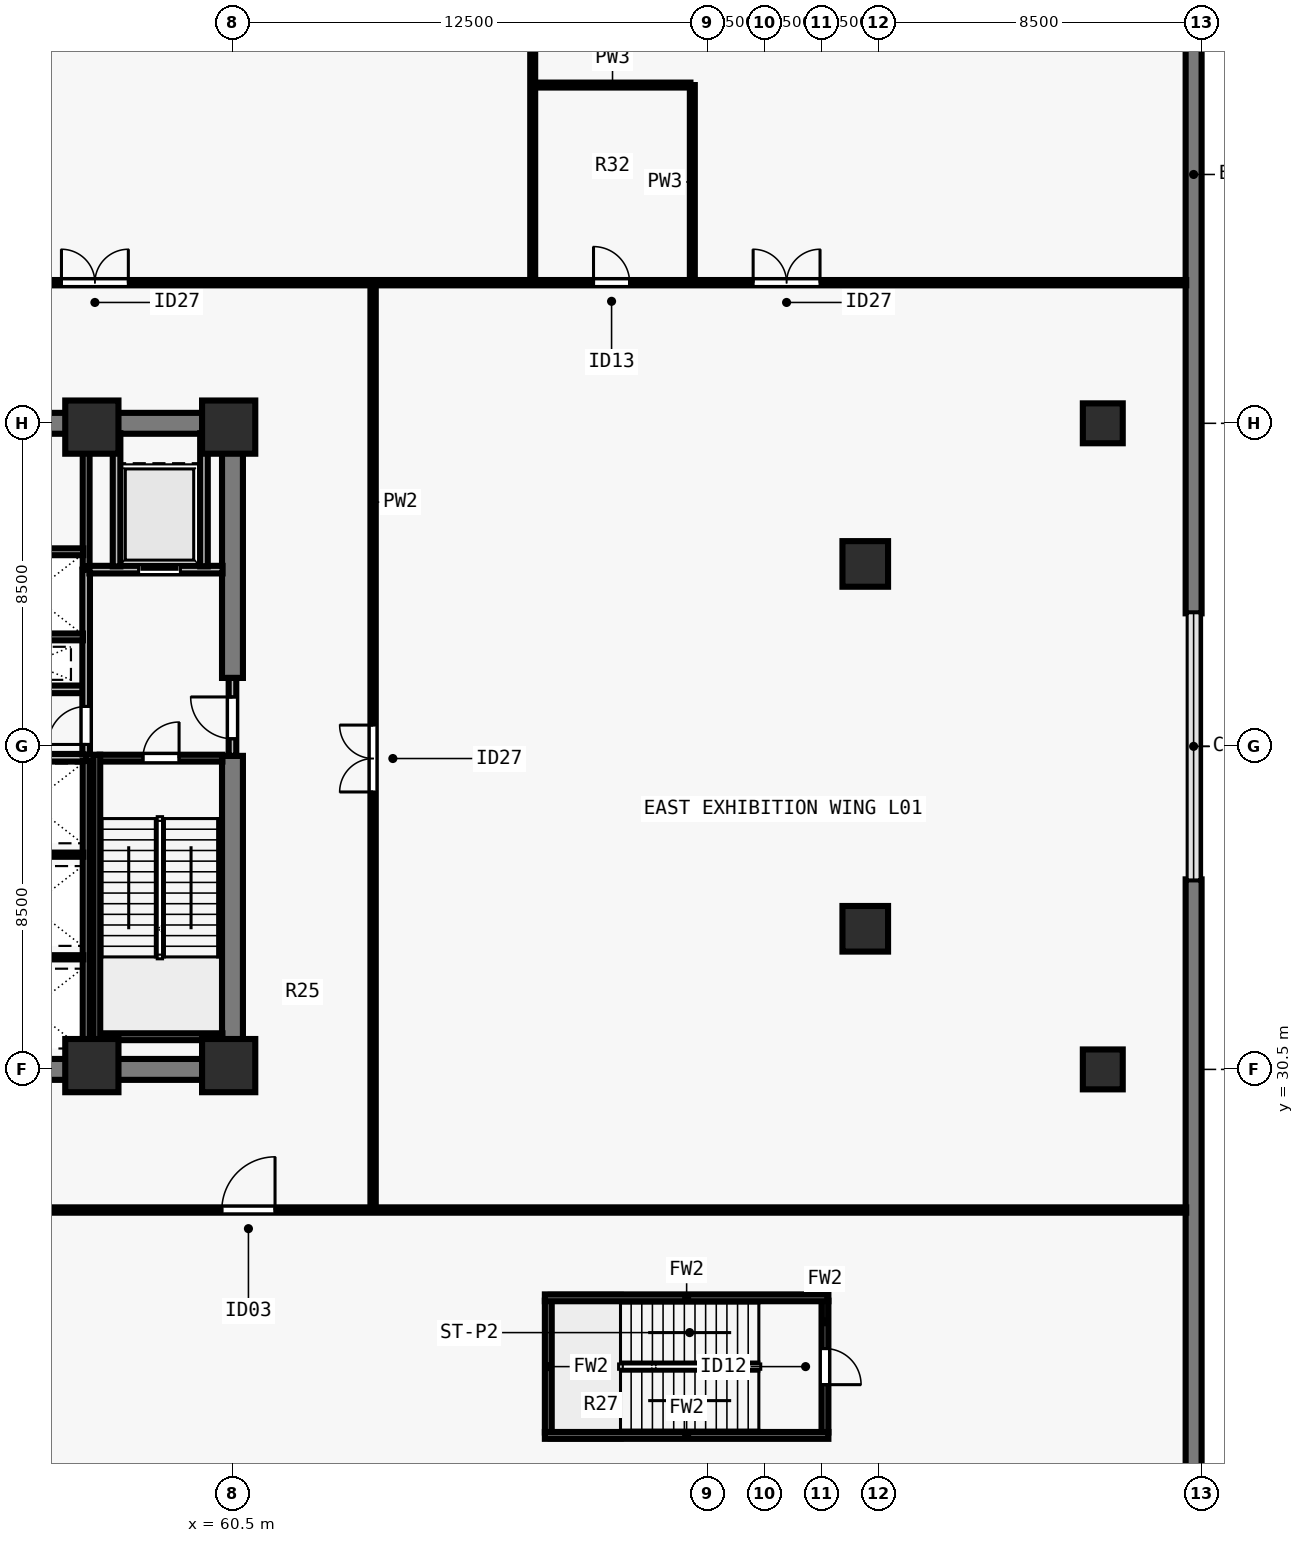
"""IFC4 building model, lengths in metres.
Left out: names, types, materials, properties, quantities, classifications, styles, units other than length and angle.
Written with IfcOpenShell. Run it as: python <this file> out.ifc"""

import sys

from ifc_helpers import new_model, si_unit, direction, frame, frame_2d, origin, origin_2d, place, context, subcontext, project, spatial, rectangle, extrude, element, fill, save


model = new_model("IFC4")
c1 = context("Model", 3, precision=1e-05, world=origin(), true_north=direction((0.0, 1.0)))
c2 = subcontext(c1, "Body", "Model", "MODEL_VIEW")
j1 = project(units=[si_unit("LENGTHUNIT", "METRE"), si_unit("PLANEANGLEUNIT", "RADIAN")], contexts=[c1])
p1 = place(None, origin())
s1 = spatial("IfcSite", under=j1, at=p1, CompositionType="ELEMENT")
p2 = place(p1, origin())
s2 = spatial("IfcBuilding", under=s1, at=p2, CompositionType="ELEMENT")
p3 = place(p2, frame((0.0, 0.0, 5.0)))
s3 = spatial("IfcBuildingStorey", under=s2, at=p3, CompositionType="ELEMENT", Elevation=5.0)
for number, where, z_axis, x_axis in (
    (1, (56.8, 30.6, 0.0), (0.0, 0.0, 1.0), (1.0, 0.0, 0.0)),
    (2, (60.4, 30.6, 0.0), (0.0, 0.0, 1.0), (1.0, 0.0, 0.0)),
    (3, (56.8, 47.4, 0.0), (0.0, 0.0, 1.0), (1.0, 0.0, 0.0)),
    (4, (60.4, 47.4, 0.0), (0.0, 0.0, 1.0), (1.0, 0.0, 0.0)),
):
    element("IfcColumn", number, at=place(p3, frame(where, z_axis=z_axis, x_axis=x_axis)), inside=s3, PredefinedType="COLUMN", context=c2, shape_type="SweptSolid", body=[
        extrude(rectangle(XDim=1.4, YDim=1.4, at=origin_2d()), origin(), (0.0, 0.0, 1.0), 5.0),
    ])
for number, where, z_axis, x_axis in (
    (5, (77.15, 34.2, 0.0), (0.0, 0.0, 1.0), (1.0, 0.0, 0.0)),
    (6, (77.15, 43.8, 0.0), (0.0, 0.0, 1.0), (1.0, 0.0, 0.0)),
):
    element("IfcColumn", number, at=place(p3, frame(where, z_axis=z_axis, x_axis=x_axis)), inside=s3, PredefinedType="COLUMN", context=c2, shape_type="SweptSolid", body=[
        extrude(rectangle(XDim=1.2, YDim=1.2, at=origin_2d()), origin(), (0.0, 0.0, 1.0), 5.0),
    ])
for number, where, z_axis, x_axis in (
    (7, (83.4, 30.5, 0.0), (0.0, 0.0, 1.0), (1.0, 0.0, 0.0)),
    (8, (83.4, 47.5, 0.0), (0.0, 0.0, 1.0), (1.0, 0.0, 0.0)),
):
    element("IfcColumn", number, at=place(p3, frame(where, z_axis=z_axis, x_axis=x_axis)), inside=s3, PredefinedType="COLUMN", context=c2, shape_type="SweptSolid", body=[
        extrude(rectangle(XDim=1.05, YDim=1.05, at=origin_2d()), origin(), (0.0, 0.0, 1.0), 5.0),
    ])
for number, where, z_axis, x_axis in (
    (9, (85.79, 65.595, 0.0), (0.0, 0.0, 1.0), (0.0, -1.0, 0.0)),
    (10, (85.79, 35.5, 0.0), (0.0, 0.0, 1.0), (0.0, -1.0, 0.0)),
):
    element("IfcWall", number, at=place(p3, frame(where, z_axis=z_axis, x_axis=x_axis)), inside=s3, PredefinedType="SOLIDWALL", context=c2, shape_type="SweptSolid", body=[
        extrude(rectangle(XDim=23.095, YDim=0.42, at=frame_2d((11.547, 0.0))), origin(), (0.0, 0.0, 1.0), 4.72),
    ])
for number, where, z_axis, x_axis in (
    (11, (43.225, 30.5, 0.0), (0.0, 0.0, 1.0), (1.0, 0.0, 0.0)),
    (12, (43.225, 47.5, 0.0), (0.0, 0.0, 1.0), (1.0, 0.0, 0.0)),
):
    element("IfcWall", number, at=place(p3, frame(where, z_axis=z_axis, x_axis=x_axis)), inside=s3, PredefinedType="SHEAR", context=c2, shape_type="SweptSolid", body=[
        extrude(rectangle(XDim=17.55, YDim=0.55, at=frame_2d((8.775, 0.0))), origin(), (0.0, 0.0, 1.0), 4.72),
    ])
p4 = place(p3, frame((60.5, 30.765, 0.0), z_axis=(0.0, 0.0, 1.0), x_axis=(0.0, 1.0, 0.0)))
e13 = element("IfcWall", 13, at=p4, inside=s3, PredefinedType="SHEAR", context=c2, shape_type="SweptSolid", body=[
    extrude(rectangle(XDim=7.985, YDim=0.55, at=frame_2d((3.993, 0.0))), origin(), (0.0, 0.0, 1.0), 4.72),
])
p5 = place(p3, frame((60.5, 40.8, 0.0), z_axis=(0.0, 0.0, 1.0), x_axis=(0.0, 1.0, 0.0)))
e14 = element("IfcWall", 14, at=p5, inside=s3, PredefinedType="SHEAR", context=c2, shape_type="SweptSolid", body=[
    extrude(rectangle(XDim=6.435, YDim=0.55, at=frame_2d((3.218, 0.0))), origin(), (0.0, 0.0, 1.0), 4.72),
])
for number, where, z_axis, x_axis in (
    (15, (53.7, 38.7, 0.0), (0.0, 0.0, 1.0), (1.0, 0.0, 0.0)),
    (16, (53.7, 40.5, 0.0), (0.0, 0.0, 1.0), (1.0, 0.0, 0.0)),
):
    element("IfcWall", number, at=place(p3, frame(where, z_axis=z_axis, x_axis=x_axis)), inside=s3, PredefinedType="SOLIDWALL", context=c2, shape_type="SweptSolid", body=[
        extrude(rectangle(XDim=2.95, YDim=0.2, at=frame_2d((1.475, 0.0))), origin(), (0.0, 0.0, 1.0), 4.72),
    ])
p6 = place(p3, frame((60.5, 38.75, 0.0), z_axis=(0.0, 0.0, 1.0), x_axis=(0.0, 1.0, 0.0)))
e17 = element("IfcWall", 17, at=p6, inside=s3, PredefinedType="SOLIDWALL", context=c2, shape_type="SweptSolid", body=[
    extrude(rectangle(XDim=2.05, YDim=0.2, at=frame_2d((1.025, 0.0))), origin(), (0.0, 0.0, 1.0), 4.72),
])
p7 = place(p6, frame((0.45, 0.0, 0.0)))
e18 = element("IfcOpeningElement", 18, at=p7, cuts=e17, PredefinedType="OPENING", context=c2, shape_type="SweptSolid", body=[
    extrude(rectangle(XDim=1.1, YDim=2.15, at=frame_2d((0.55, 1.075))), frame((0.0, 0.11, 0.0), z_axis=(0.0, -1.0, 0.0), x_axis=(1.0, 0.0, 0.0)), (0.0, 0.0, 1.0), 0.22),
])
p8 = place(p3, frame((56.65, 38.785, 0.0), z_axis=(0.0, 0.0, 1.0), x_axis=(0.0, 1.0, 0.0)))
e19 = element("IfcWall", 19, at=p8, inside=s3, PredefinedType="SOLIDWALL", context=c2, shape_type="SweptSolid", body=[
    extrude(rectangle(XDim=4.865, YDim=0.2, at=frame_2d((2.433, 0.0))), origin(), (0.0, 0.0, 1.0), 4.72),
])
p9 = place(p8, frame((0.265, 0.0, 0.0)))
e20 = element("IfcOpeningElement", 20, at=p9, cuts=e19, PredefinedType="OPENING", context=c2, shape_type="SweptSolid", body=[
    extrude(rectangle(XDim=1.0, YDim=2.15, at=frame_2d((0.5, 1.075))), frame((0.0, 0.11, 0.0), z_axis=(0.0, -1.0, 0.0), x_axis=(1.0, 0.0, 0.0)), (0.0, 0.0, 1.0), 0.22),
])
p10 = place(p3, frame((56.735, 43.65, 0.0), z_axis=(0.0, 0.0, 1.0), x_axis=(1.0, 0.0, 0.0)))
e21 = element("IfcWall", 21, at=p10, inside=s3, PredefinedType="SOLIDWALL", context=c2, shape_type="SweptSolid", body=[
    extrude(rectangle(XDim=3.505, YDim=0.2, at=frame_2d((1.752, 0.0))), origin(), (0.0, 0.0, 1.0), 4.72),
])
p11 = place(p10, frame((1.295, 0.0, 0.0)))
e22 = element("IfcOpeningElement", 22, at=p11, cuts=e21, PredefinedType="OPENING", context=c2, shape_type="SweptSolid", body=[
    extrude(rectangle(XDim=1.1, YDim=2.2, at=frame_2d((0.55, 1.1))), frame((0.0, 0.11, 0.0), z_axis=(0.0, -1.0, 0.0), x_axis=(1.0, 0.0, 0.0)), (0.0, 0.0, 1.0), 0.22),
])
for number, where, z_axis, x_axis in (
    (23, (57.45, 43.735, 0.0), (0.0, 0.0, 1.0), (0.0, 1.0, 0.0)),
    (24, (59.75, 43.735, 0.0), (0.0, 0.0, 1.0), (0.0, 1.0, 0.0)),
):
    element("IfcWall", number, at=place(p3, frame(where, z_axis=z_axis, x_axis=x_axis)), inside=s3, PredefinedType="SOLIDWALL", context=c2, shape_type="SweptSolid", body=[
        extrude(rectangle(XDim=3.505, YDim=0.2, at=frame_2d((1.752, 0.0))), origin(), (0.0, 0.0, 1.0), 4.72),
    ])
p12 = place(p3, frame((56.65, 30.76, 0.0), z_axis=(0.0, 0.0, 1.0), x_axis=(0.0, 1.0, 0.0)))
e25 = element("IfcWall", 25, at=p12, inside=s3, PredefinedType="SOLIDWALL", context=c2, shape_type="SweptSolid", body=[
    extrude(rectangle(XDim=7.855, YDim=0.18, at=frame_2d((3.927, 0.0))), origin(), (0.0, 0.0, 1.0), 4.72),
])
for number, where, z_axis, x_axis in (
    (26, (53.785, 33.45, 0.0), (0.0, 0.0, 1.0), (1.0, 0.0, 0.0)),
    (27, (53.785, 36.15, 0.0), (0.0, 0.0, 1.0), (1.0, 0.0, 0.0)),
):
    element("IfcWall", number, at=place(p3, frame(where, z_axis=z_axis, x_axis=x_axis)), inside=s3, PredefinedType="PARTITIONING", context=c2, shape_type="SweptSolid", body=[
        extrude(rectangle(XDim=2.79, YDim=0.11, at=frame_2d((1.395, 0.0))), origin(), (0.0, 0.0, 1.0), 4.72),
    ])
p13 = place(p3, frame((56.65, 43.735, 0.0), z_axis=(0.0, 0.0, 1.0), x_axis=(0.0, 1.0, 0.0)))
e28 = element("IfcWall", 28, at=p13, inside=s3, PredefinedType="SOLIDWALL", context=c2, shape_type="SweptSolid", body=[
    extrude(rectangle(XDim=3.505, YDim=0.18, at=frame_2d((1.752, 0.0))), origin(), (0.0, 0.0, 1.0), 4.72),
])
p14 = place(p3, frame((53.785, 41.88, 0.0), z_axis=(0.0, 0.0, 1.0), x_axis=(1.0, 0.0, 0.0)))
e29 = element("IfcWall", 29, at=p14, inside=s3, PredefinedType="SOLIDWALL", context=c2, shape_type="SweptSolid", body=[
    extrude(rectangle(XDim=2.78, YDim=0.18, at=frame_2d((1.39, 0.0))), origin(), (0.0, 0.0, 1.0), 4.72),
])
p15 = place(p3, frame((53.785, 44.12, 0.0), z_axis=(0.0, 0.0, 1.0), x_axis=(1.0, 0.0, 0.0)))
e30 = element("IfcWall", 30, at=p15, inside=s3, PredefinedType="SOLIDWALL", context=c2, shape_type="SweptSolid", body=[
    extrude(rectangle(XDim=2.79, YDim=0.18, at=frame_2d((1.395, 0.0))), origin(), (0.0, 0.0, 1.0), 4.72),
])
p16 = place(p3, frame((18.405, 26.8, 0.0), z_axis=(0.0, 0.0, 1.0), x_axis=(1.0, 0.0, 0.0)))
e31 = element("IfcWall", 31, at=p16, inside=s3, PredefinedType="PARTITIONING", context=c2, shape_type="SweptSolid", body=[
    extrude(rectangle(XDim=67.19, YDim=0.14, at=frame_2d((33.595, 0.0))), origin(), (0.0, 0.0, 1.0), 4.238),
])
p17 = place(p16, frame((13.815, 0.0, 0.0)))
e32 = element("IfcOpeningElement", 32, at=p17, cuts=e31, PredefinedType="OPENING", context=c2, shape_type="SweptSolid", body=[
    extrude(rectangle(XDim=1.4, YDim=2.2, at=frame_2d((0.7, 1.1))), frame((0.0, 0.08, 0.0), z_axis=(0.0, -1.0, 0.0), x_axis=(1.0, 0.0, 0.0)), (0.0, 0.0, 1.0), 0.16),
])
p18 = place(p16, frame((41.815, 0.0, 0.0)))
e33 = element("IfcOpeningElement", 33, at=p18, cuts=e31, PredefinedType="OPENING", context=c2, shape_type="SweptSolid", body=[
    extrude(rectangle(XDim=1.4, YDim=2.2, at=frame_2d((0.7, 1.1))), frame((0.0, 0.08, 0.0), z_axis=(0.0, -1.0, 0.0), x_axis=(1.0, 0.0, 0.0)), (0.0, 0.0, 1.0), 0.16),
])
p19 = place(p3, frame((18.405, 51.2, 0.0), z_axis=(0.0, 0.0, 1.0), x_axis=(1.0, 0.0, 0.0)))
e34 = element("IfcWall", 34, at=p19, inside=s3, PredefinedType="PARTITIONING", context=c2, shape_type="SweptSolid", body=[
    extrude(rectangle(XDim=67.19, YDim=0.14, at=frame_2d((33.595, 0.0))), origin(), (0.0, 0.0, 1.0), 4.238),
])
p20 = place(p19, frame((24.795, 0.0, 0.0)))
e35 = element("IfcOpeningElement", 35, at=p20, cuts=e34, PredefinedType="OPENING", context=c2, shape_type="SweptSolid", body=[
    extrude(rectangle(XDim=1.76, YDim=2.2, at=frame_2d((0.88, 1.1))), frame((0.0, 0.08, 0.0), z_axis=(0.0, -1.0, 0.0), x_axis=(1.0, 0.0, 0.0)), (0.0, 0.0, 1.0), 0.16),
])
p21 = place(p19, frame((37.595, 0.0, 0.0)))
e36 = element("IfcOpeningElement", 36, at=p21, cuts=e34, PredefinedType="OPENING", context=c2, shape_type="SweptSolid", body=[
    extrude(rectangle(XDim=1.76, YDim=2.2, at=frame_2d((0.88, 1.1))), frame((0.0, 0.08, 0.0), z_axis=(0.0, -1.0, 0.0), x_axis=(1.0, 0.0, 0.0)), (0.0, 0.0, 1.0), 0.16),
])
p22 = place(p19, frame((51.595, 0.0, 0.0)))
e37 = element("IfcOpeningElement", 37, at=p22, cuts=e34, PredefinedType="OPENING", context=c2, shape_type="SweptSolid", body=[
    extrude(rectangle(XDim=0.95, YDim=2.1, at=frame_2d((0.475, 1.05))), frame((0.0, 0.08, 0.0), z_axis=(0.0, -1.0, 0.0), x_axis=(1.0, 0.0, 0.0)), (0.0, 0.0, 1.0), 0.16),
])
p23 = place(p19, frame((55.795, 0.0, 0.0)))
e38 = element("IfcOpeningElement", 38, at=p23, cuts=e34, PredefinedType="OPENING", context=c2, shape_type="SweptSolid", body=[
    extrude(rectangle(XDim=1.76, YDim=2.2, at=frame_2d((0.88, 1.1))), frame((0.0, 0.08, 0.0), z_axis=(0.0, -1.0, 0.0), x_axis=(1.0, 0.0, 0.0)), (0.0, 0.0, 1.0), 0.16),
])
p24 = place(p3, frame((64.2, 26.855, 0.0), z_axis=(0.0, 0.0, 1.0), x_axis=(0.0, 1.0, 0.0)))
e39 = element("IfcWall", 39, at=p24, inside=s3, PredefinedType="PARTITIONING", context=c2, shape_type="SweptSolid", body=[
    extrude(rectangle(XDim=24.29, YDim=0.14, at=frame_2d((12.145, 0.0))), origin(), (0.0, 0.0, 1.0), 4.72),
])
p25 = place(p24, frame((10.945, 0.0, 0.0)))
e40 = element("IfcOpeningElement", 40, at=p25, cuts=e39, PredefinedType="OPENING", context=c2, shape_type="SweptSolid", body=[
    extrude(rectangle(XDim=1.76, YDim=2.2, at=frame_2d((0.88, 1.1))), frame((0.0, 0.08, 0.0), z_axis=(0.0, -1.0, 0.0), x_axis=(1.0, 0.0, 0.0)), (0.0, 0.0, 1.0), 0.16),
])
p26 = place(p3, frame((68.4, 51.3, 0.0), z_axis=(0.0, 0.0, 1.0), x_axis=(0.0, 1.0, 0.0)))
e41 = element("IfcWall", 41, at=p26, inside=s3, PredefinedType="PLUMBINGWALL", context=c2, shape_type="SweptSolid", body=[
    extrude(rectangle(XDim=14.295, YDim=0.13, at=frame_2d((7.147, 0.0))), origin(), (0.0, 0.0, 1.0), 3.771),
])
p27 = place(p3, frame((72.6, 51.3, 0.0), z_axis=(0.0, 0.0, 1.0), x_axis=(0.0, 1.0, 0.0)))
e42 = element("IfcWall", 42, at=p27, inside=s3, PredefinedType="PLUMBINGWALL", context=c2, shape_type="SweptSolid", body=[
    extrude(rectangle(XDim=5.1, YDim=0.13, at=frame_2d((2.55, 0.0))), origin(), (0.0, 0.0, 1.0), 4.72),
])
p28 = place(p3, frame((68.45, 56.4, 0.0), z_axis=(0.0, 0.0, 1.0), x_axis=(1.0, 0.0, 0.0)))
e43 = element("IfcWall", 43, at=p28, inside=s3, PredefinedType="PLUMBINGWALL", context=c2, shape_type="SweptSolid", body=[
    extrude(rectangle(XDim=4.1, YDim=0.13, at=frame_2d((2.05, 0.0))), origin(), (0.0, 0.0, 1.0), 4.238),
])
p29 = place(p3, frame((57.005, 38.69, 0.0), z_axis=(0.0, 0.0, 1.0), x_axis=(1.0, 0.0, 0.0)))
e44 = element("IfcWall", 44, at=p29, inside=s3, PredefinedType="SOLIDWALL", context=c2, shape_type="SweptSolid", body=[
    extrude(rectangle(XDim=3.23, YDim=0.18, at=frame_2d((1.615, 0.0))), origin(), (0.0, 0.0, 1.0), 4.72),
])
p30 = place(p29, frame((1.14, 0.0, 0.0)))
e45 = element("IfcOpeningElement", 45, at=p30, cuts=e44, PredefinedType="OPENING", context=c2, shape_type="SweptSolid", body=[
    extrude(rectangle(XDim=0.95, YDim=2.15, at=frame_2d((0.475, 1.075))), frame((0.0, 0.1, 0.0), z_axis=(0.0, -1.0, 0.0), x_axis=(1.0, 0.0, 0.0)), (0.0, 0.0, 1.0), 0.2),
])
p31 = place(p3, frame((57.005, 31.36, 0.0), z_axis=(0.0, 0.0, 1.0), x_axis=(1.0, 0.0, 0.0)))
e46 = element("IfcWall", 46, at=p31, inside=s3, PredefinedType="SOLIDWALL", context=c2, shape_type="SweptSolid", body=[
    extrude(rectangle(XDim=3.23, YDim=0.18, at=frame_2d((1.615, 0.0))), origin(), (0.0, 0.0, 1.0), 4.72),
])
p32 = place(p3, frame((56.93, 38.78, 0.0), z_axis=(0.0, 0.0, 1.0), x_axis=(0.0, -1.0, 0.0)))
e47 = element("IfcWall", 47, at=p32, inside=s3, PredefinedType="SOLIDWALL", context=c2, shape_type="SweptSolid", body=[
    extrude(rectangle(XDim=8.017, YDim=0.18, at=frame_2d((4.009, 0.0))), origin(), (0.0, 0.0, 1.0), 4.72),
])
p33 = place(p3, frame((76.09, 24.415, 0.0), z_axis=(0.0, 0.0, 1.0), x_axis=(0.0, -1.0, 0.0)))
e48 = element("IfcWall", 48, at=p33, inside=s3, PredefinedType="SOLIDWALL", context=c2, shape_type="SweptSolid", body=[
    extrude(rectangle(XDim=3.47, YDim=0.18, at=frame_2d((1.735, 0.0))), origin(), (0.0, 0.0, 1.0), 4.72),
])
p34 = place(p33, frame((1.26, 0.0, 0.0)))
e49 = element("IfcOpeningElement", 49, at=p34, cuts=e48, PredefinedType="OPENING", context=c2, shape_type="SweptSolid", body=[
    extrude(rectangle(XDim=0.95, YDim=2.15, at=frame_2d((0.475, 1.075))), frame((0.0, 0.1, 0.0), z_axis=(0.0, -1.0, 0.0), x_axis=(1.0, 0.0, 0.0)), (0.0, 0.0, 1.0), 0.2),
])
p35 = place(p3, frame((68.81, 24.415, 0.0), z_axis=(0.0, 0.0, 1.0), x_axis=(0.0, -1.0, 0.0)))
e50 = element("IfcWall", 50, at=p35, inside=s3, PredefinedType="SOLIDWALL", context=c2, shape_type="SweptSolid", body=[
    extrude(rectangle(XDim=3.47, YDim=0.18, at=frame_2d((1.735, 0.0))), origin(), (0.0, 0.0, 1.0), 4.72),
])
for number, where, z_axis, x_axis in (
    (51, (76.18, 24.49, 0.0), (0.0, 0.0, 1.0), (-1.0, 0.0, 0.0)),
    (52, (76.18, 20.87, 0.0), (0.0, 0.0, 1.0), (-1.0, 0.0, 0.0)),
):
    element("IfcWall", number, at=place(p3, frame(where, z_axis=z_axis, x_axis=x_axis)), inside=s3, PredefinedType="SOLIDWALL", context=c2, shape_type="SweptSolid", body=[
        extrude(rectangle(XDim=7.46, YDim=0.18, at=frame_2d((3.73, 0.0))), origin(), (0.0, 0.0, 1.0), 4.72),
    ])
p36 = place(p7, origin())
e53 = element("IfcDoor", 53, at=p36, inside=s3, OperationType="SINGLE_SWING_RIGHT", PredefinedType="DOOR", context=c2, shape_type="SweptSolid", body=[
    extrude(rectangle(XDim=1.1, YDim=2.15, at=frame_2d((0.55, 1.075))), frame((0.0, 0.025, 0.0), z_axis=(0.0, -1.0, 0.0), x_axis=(1.0, 0.0, 0.0)), (0.0, 0.0, 1.0), 0.05),
])
fill(e18, e53)
p37 = place(p9, origin())
e54 = element("IfcDoor", 54, at=p37, inside=s3, OperationType="SINGLE_SWING_LEFT", PredefinedType="DOOR", context=c2, shape_type="SweptSolid", body=[
    extrude(rectangle(XDim=1.0, YDim=2.15, at=frame_2d((0.5, 1.075))), frame((0.0, 0.025, 0.0), z_axis=(0.0, -1.0, 0.0), x_axis=(1.0, 0.0, 0.0)), (0.0, 0.0, 1.0), 0.05),
])
fill(e20, e54)
p38 = place(p11, origin())
e55 = element("IfcDoor", 55, at=p38, inside=s3, OperationType="SLIDING_TO_LEFT", PredefinedType="DOOR", context=c2, shape_type="SweptSolid", body=[
    extrude(rectangle(XDim=1.1, YDim=2.2, at=frame_2d((0.55, 1.1))), frame((0.0, 0.025, 0.0), z_axis=(0.0, -1.0, 0.0), x_axis=(1.0, 0.0, 0.0)), (0.0, 0.0, 1.0), 0.05),
])
fill(e22, e55)
p39 = place(p18, origin())
e56 = element("IfcDoor", 56, at=p39, inside=s3, OperationType="SINGLE_SWING_RIGHT", PredefinedType="DOOR", context=c2, shape_type="SweptSolid", body=[
    extrude(rectangle(XDim=1.4, YDim=2.2, at=frame_2d((0.7, 1.1))), frame((0.0, 0.025, 0.0), z_axis=(0.0, -1.0, 0.0), x_axis=(1.0, 0.0, 0.0)), (0.0, 0.0, 1.0), 0.05),
])
fill(e33, e56)
p40 = place(p21, origin())
e57 = element("IfcDoor", 57, at=p40, inside=s3, OperationType="DOUBLE_DOOR_SINGLE_SWING", PredefinedType="DOOR", context=c2, shape_type="SweptSolid", body=[
    extrude(rectangle(XDim=1.76, YDim=2.2, at=frame_2d((0.88, 1.1))), frame((0.0, 0.025, 0.0), z_axis=(0.0, -1.0, 0.0), x_axis=(1.0, 0.0, 0.0)), (0.0, 0.0, 1.0), 0.05),
])
fill(e36, e57)
p41 = place(p22, origin())
e58 = element("IfcDoor", 58, at=p41, inside=s3, OperationType="SINGLE_SWING_LEFT", PredefinedType="DOOR", context=c2, shape_type="SweptSolid", body=[
    extrude(rectangle(XDim=0.95, YDim=2.1, at=frame_2d((0.475, 1.05))), frame((0.0, 0.025, 0.0), z_axis=(0.0, -1.0, 0.0), x_axis=(1.0, 0.0, 0.0)), (0.0, 0.0, 1.0), 0.05),
])
fill(e37, e58)
p42 = place(p23, origin())
e59 = element("IfcDoor", 59, at=p42, inside=s3, OperationType="DOUBLE_DOOR_SINGLE_SWING", PredefinedType="DOOR", context=c2, shape_type="SweptSolid", body=[
    extrude(rectangle(XDim=1.76, YDim=2.2, at=frame_2d((0.88, 1.1))), frame((0.0, 0.025, 0.0), z_axis=(0.0, -1.0, 0.0), x_axis=(1.0, 0.0, 0.0)), (0.0, 0.0, 1.0), 0.05),
])
fill(e38, e59)
p43 = place(p25, origin())
e60 = element("IfcDoor", 60, at=p43, inside=s3, OperationType="DOUBLE_DOOR_SINGLE_SWING", PredefinedType="DOOR", context=c2, shape_type="SweptSolid", body=[
    extrude(rectangle(XDim=1.76, YDim=2.2, at=frame_2d((0.88, 1.1))), frame((0.0, 0.025, 0.0), z_axis=(0.0, -1.0, 0.0), x_axis=(1.0, 0.0, 0.0)), (0.0, 0.0, 1.0), 0.05),
])
fill(e40, e60)
p44 = place(p30, origin())
e61 = element("IfcDoor", 61, at=p44, inside=s3, OperationType="SINGLE_SWING_RIGHT", PredefinedType="DOOR", context=c2, shape_type="SweptSolid", body=[
    extrude(rectangle(XDim=0.95, YDim=2.15, at=frame_2d((0.475, 1.075))), frame((0.0, 0.025, 0.0), z_axis=(0.0, -1.0, 0.0), x_axis=(1.0, 0.0, 0.0)), (0.0, 0.0, 1.0), 0.05),
])
fill(e45, e61)
p45 = place(p34, origin())
e62 = element("IfcDoor", 62, at=p45, inside=s3, OperationType="SINGLE_SWING_RIGHT", PredefinedType="DOOR", context=c2, shape_type="SweptSolid", body=[
    extrude(rectangle(XDim=0.95, YDim=2.15, at=frame_2d((0.475, 1.075))), frame((0.0, 0.025, 0.0), z_axis=(0.0, -1.0, 0.0), x_axis=(1.0, 0.0, 0.0)), (0.0, 0.0, 1.0), 0.05),
])
fill(e49, e62)
save(model, sys.argv[1])
